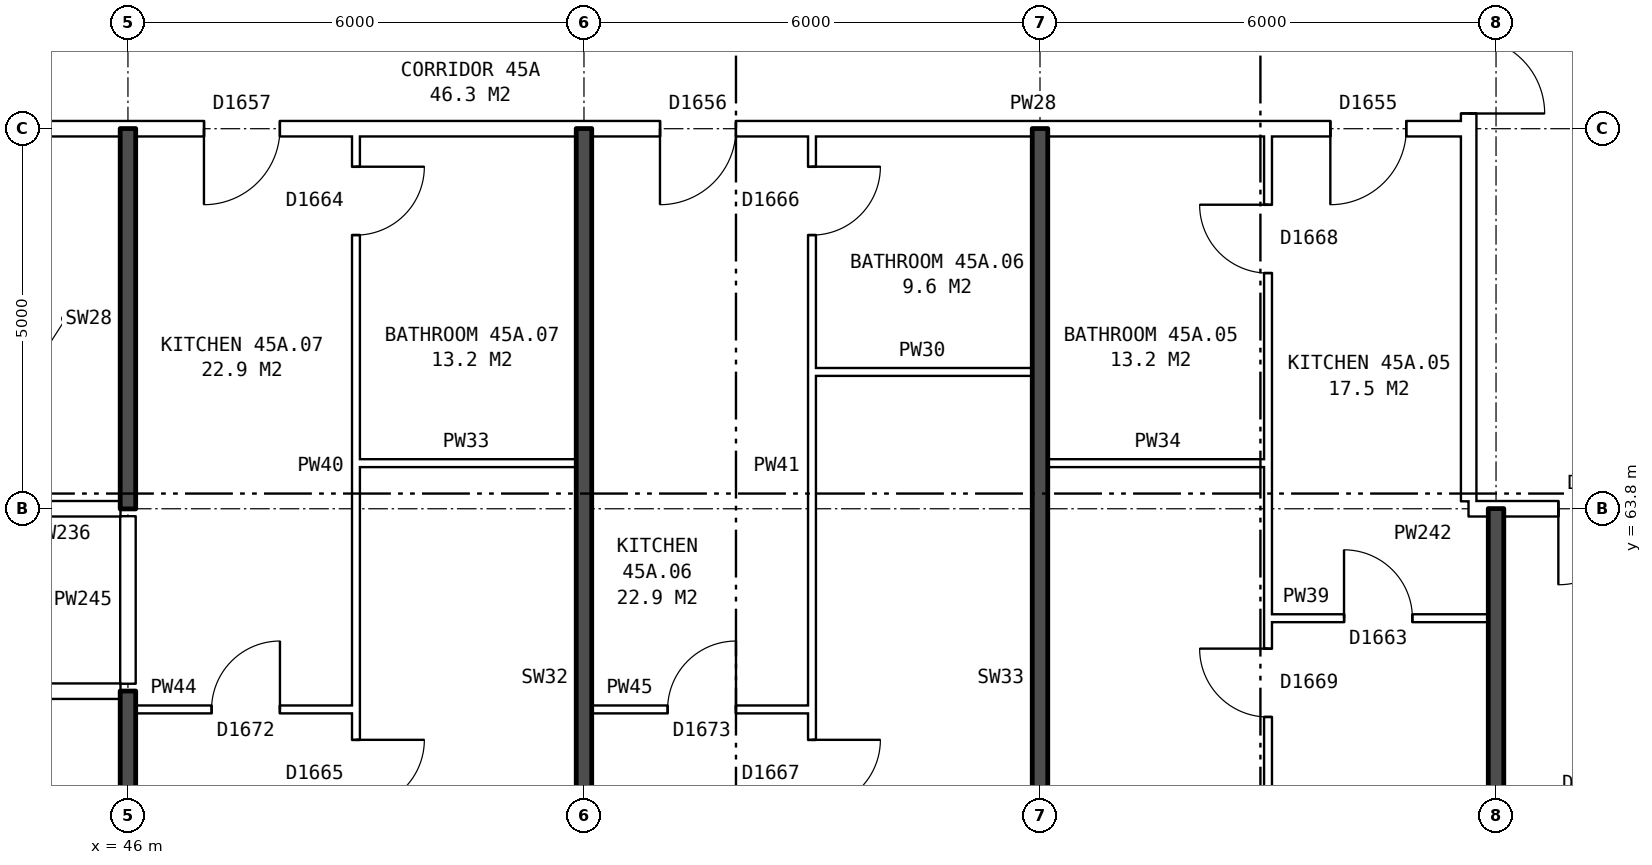
"""IFC4 building model, lengths in metres.
Left out: names, types, materials, properties, quantities, classifications, styles, units other than length and angle.
Written with IfcOpenShell. Run it as: python <this file> out.ifc"""

import sys

from ifc_helpers import new_model, si_unit, direction, frame, frame_2d, origin, place, context, subcontext, project, spatial, rectangle, extrude, element, fill, save


model = new_model("IFC4")
c1 = context("Model", 3, precision=1e-05, world=origin(), true_north=direction((0.0, 1.0)))
c2 = subcontext(c1, "Body", "Model", "MODEL_VIEW")
j1 = project(units=[si_unit("LENGTHUNIT", "METRE"), si_unit("PLANEANGLEUNIT", "RADIAN")], contexts=[c1])
p1 = place(None, origin())
s1 = spatial("IfcSite", under=j1, at=p1, CompositionType="ELEMENT")
p2 = place(p1, origin())
s2 = spatial("IfcBuilding", under=s1, at=p2, CompositionType="ELEMENT")
p3 = place(p2, frame((0.0, 0.0, 160.9)))
s3 = spatial("IfcBuildingStorey", under=s2, at=p3, CompositionType="ELEMENT", Elevation=160.9)
p4 = place(p3, frame((63.64, 63.9, 0.0), z_axis=(0.0, 0.0, 1.0), x_axis=(0.0, 1.0, 0.0)))
e1 = element("IfcWall", 1, at=p4, inside=s3, PredefinedType="PARTITIONING", context=c2, shape_type="SweptSolid", body=[
    extrude(rectangle(XDim=12.2, YDim=0.2, at=frame_2d((6.1, 0.0))), origin(), (0.0, 0.0, 1.0), 2.85),
])
p5 = place(p4, frame((5.1, 0.0, 0.0)))
e2 = element("IfcOpeningElement", 2, at=p5, cuts=e1, PredefinedType="OPENING", context=c2, shape_type="SweptSolid", body=[
    extrude(rectangle(XDim=2.0, YDim=2.1, at=frame_2d((1.0, 1.05))), frame((0.0, 0.11, 0.0), z_axis=(0.0, -1.0, 0.0), x_axis=(1.0, 0.0, 0.0)), (0.0, 0.0, 1.0), 0.22),
])
p6 = place(p3, frame((46.1, 61.16, 0.0), z_axis=(0.0, 0.0, 1.0), x_axis=(1.0, 0.0, 0.0)))
e3 = element("IfcWall", 3, at=p6, inside=s3, PredefinedType="PARTITIONING", context=c2, shape_type="SweptSolid", body=[
    extrude(rectangle(XDim=2.9, YDim=0.1, at=frame_2d((1.45, 0.0))), origin(), (0.0, 0.0, 1.0), 2.85),
])
p7 = place(p6, frame((1.0, 0.0, 0.0)))
e4 = element("IfcOpeningElement", 4, at=p7, cuts=e3, PredefinedType="OPENING", context=c2, shape_type="SweptSolid", body=[
    extrude(rectangle(XDim=0.9, YDim=2.1, at=frame_2d((0.45, 1.05))), frame((0.0, 0.06, 0.0), z_axis=(0.0, -1.0, 0.0), x_axis=(1.0, 0.0, 0.0)), (0.0, 0.0, 1.0), 0.12),
])
p8 = place(p3, frame((52.1, 61.16, 0.0), z_axis=(0.0, 0.0, 1.0), x_axis=(1.0, 0.0, 0.0)))
e5 = element("IfcWall", 5, at=p8, inside=s3, PredefinedType="PARTITIONING", context=c2, shape_type="SweptSolid", body=[
    extrude(rectangle(XDim=2.9, YDim=0.1, at=frame_2d((1.45, 0.0))), origin(), (0.0, 0.0, 1.0), 2.85),
])
p9 = place(p8, frame((1.0, 0.0, 0.0)))
e6 = element("IfcOpeningElement", 6, at=p9, cuts=e5, PredefinedType="OPENING", context=c2, shape_type="SweptSolid", body=[
    extrude(rectangle(XDim=0.9, YDim=2.1, at=frame_2d((0.45, 1.05))), frame((0.0, 0.06, 0.0), z_axis=(0.0, -1.0, 0.0), x_axis=(1.0, 0.0, 0.0)), (0.0, 0.0, 1.0), 0.12),
])
p10 = place(p3, frame((28.86, 61.4, 0.0), z_axis=(0.0, 0.0, 1.0), x_axis=(1.0, 0.0, 0.0)))
e7 = element("IfcWall", 7, at=p10, inside=s3, PredefinedType="PARTITIONING", context=c2, shape_type="SweptSolid", body=[
    extrude(rectangle(XDim=17.04, YDim=0.2, at=frame_2d((8.52, 0.0))), origin(), (0.0, 0.0, 1.0), 2.85),
])
p11 = place(p10, frame((14.59, 0.0, 0.0)))
e8 = element("IfcOpeningElement", 8, at=p11, cuts=e7, PredefinedType="OPENING", context=c2, shape_type="SweptSolid", body=[
    extrude(rectangle(XDim=1.0, YDim=2.1, at=frame_2d((0.5, 1.05))), frame((0.0, 0.11, 0.0), z_axis=(0.0, -1.0, 0.0), x_axis=(1.0, 0.0, 0.0)), (0.0, 0.0, 1.0), 0.22),
])
p12 = place(p10, frame((7.64, 0.0, 0.0)))
e9 = element("IfcOpeningElement", 9, at=p12, cuts=e7, PredefinedType="OPENING", context=c2, shape_type="SweptSolid", body=[
    extrude(rectangle(XDim=1.0, YDim=2.1, at=frame_2d((0.5, 1.05))), frame((0.0, 0.11, 0.0), z_axis=(0.0, -1.0, 0.0), x_axis=(1.0, 0.0, 0.0)), (0.0, 0.0, 1.0), 0.22),
])
p13 = place(p3, frame((61.0, 62.36, 0.0), z_axis=(0.0, 0.0, 1.0), x_axis=(1.0, 0.0, 0.0)))
e10 = element("IfcWall", 10, at=p13, inside=s3, PredefinedType="PARTITIONING", context=c2, shape_type="SweptSolid", body=[
    extrude(rectangle(XDim=2.9, YDim=0.1, at=frame_2d((1.45, 0.0))), origin(), (0.0, 0.0, 1.0), 2.85),
])
p14 = place(p13, frame((1.0, 0.0, 0.0)))
e11 = element("IfcOpeningElement", 11, at=p14, cuts=e10, PredefinedType="OPENING", context=c2, shape_type="SweptSolid", body=[
    extrude(rectangle(XDim=0.9, YDim=2.1, at=frame_2d((0.45, 1.05))), frame((0.0, 0.06, 0.0), z_axis=(0.0, -1.0, 0.0), x_axis=(1.0, 0.0, 0.0)), (0.0, 0.0, 1.0), 0.12),
])
p15 = place(p3, frame((44.36, 63.8, 0.0), z_axis=(0.0, 0.0, 1.0), x_axis=(1.0, 0.0, 0.0)))
e12 = element("IfcWall", 12, at=p15, inside=s3, PredefinedType="PARTITIONING", context=c2, shape_type="SweptSolid", body=[
    extrude(rectangle(XDim=1.54, YDim=0.2, at=frame_2d((0.77, 0.0))), origin(), (0.0, 0.0, 1.0), 2.85),
])
p16 = place(p3, frame((63.64, 63.8, 0.0), z_axis=(0.0, 0.0, 1.0), x_axis=(1.0, 0.0, 0.0)))
e13 = element("IfcWall", 13, at=p16, inside=s3, PredefinedType="PARTITIONING", context=c2, shape_type="SweptSolid", body=[
    extrude(rectangle(XDim=3.0, YDim=0.2, at=frame_2d((1.5, 0.0))), origin(), (0.0, 0.0, 1.0), 2.85),
])
p17 = place(p16, frame((1.18, 0.0, 0.0)))
e14 = element("IfcOpeningElement", 14, at=p17, cuts=e13, PredefinedType="OPENING", context=c2, shape_type="SweptSolid", body=[
    extrude(rectangle(XDim=1.0, YDim=2.1, at=frame_2d((0.5, 1.05))), frame((0.0, 0.11, 0.0), z_axis=(0.0, -1.0, 0.0), x_axis=(1.0, 0.0, 0.0)), (0.0, 0.0, 1.0), 0.22),
])
for number, where, z_axis, x_axis in (
    (15, (49.0, 64.4, 0.0), (0.0, 0.0, 1.0), (1.0, 0.0, 0.0)),
    (16, (58.1, 64.4, 0.0), (0.0, 0.0, 1.0), (1.0, 0.0, 0.0)),
    (17, (55.0, 65.6, 0.0), (0.0, 0.0, 1.0), (1.0, 0.0, 0.0)),
):
    element("IfcWall", number, at=place(p3, frame(where, z_axis=z_axis, x_axis=x_axis)), inside=s3, PredefinedType="PARTITIONING", context=c2, shape_type="SweptSolid", body=[
        extrude(rectangle(XDim=2.9, YDim=0.1, at=frame_2d((1.45, 0.0))), origin(), (0.0, 0.0, 1.0), 2.85),
    ])
p18 = place(p3, frame((44.36, 68.8, 0.0), z_axis=(0.0, 0.0, 1.0), x_axis=(1.0, 0.0, 0.0)))
e18 = element("IfcWall", 18, at=p18, inside=s3, PredefinedType="PARTITIONING", context=c2, shape_type="SweptSolid", body=[
    extrude(rectangle(XDim=19.28, YDim=0.2, at=frame_2d((9.64, 0.0))), origin(), (0.0, 0.0, 1.0), 2.85),
])
p19 = place(p18, frame((17.46, 0.0, 0.0)))
e19 = element("IfcOpeningElement", 19, at=p19, cuts=e18, PredefinedType="OPENING", context=c2, shape_type="SweptSolid", body=[
    extrude(rectangle(XDim=1.0, YDim=2.1, at=frame_2d((0.5, 1.05))), frame((0.0, 0.11, 0.0), z_axis=(0.0, -1.0, 0.0), x_axis=(1.0, 0.0, 0.0)), (0.0, 0.0, 1.0), 0.22),
])
p20 = place(p18, frame((8.64, 0.0, 0.0)))
e20 = element("IfcOpeningElement", 20, at=p20, cuts=e18, PredefinedType="OPENING", context=c2, shape_type="SweptSolid", body=[
    extrude(rectangle(XDim=1.0, YDim=2.1, at=frame_2d((0.5, 1.05))), frame((0.0, 0.11, 0.0), z_axis=(0.0, -1.0, 0.0), x_axis=(1.0, 0.0, 0.0)), (0.0, 0.0, 1.0), 0.22),
])
p21 = place(p18, frame((2.64, 0.0, 0.0)))
e21 = element("IfcOpeningElement", 21, at=p21, cuts=e18, PredefinedType="OPENING", context=c2, shape_type="SweptSolid", body=[
    extrude(rectangle(XDim=1.0, YDim=2.1, at=frame_2d((0.5, 1.05))), frame((0.0, 0.11, 0.0), z_axis=(0.0, -1.0, 0.0), x_axis=(1.0, 0.0, 0.0)), (0.0, 0.0, 1.0), 0.22),
])
p22 = place(p3, frame((46.0, 54.36, 0.0), z_axis=(0.0, 0.0, 1.0), x_axis=(0.0, 1.0, 0.0)))
e22 = element("IfcWall", 22, at=p22, inside=s3, PredefinedType="SOLIDWALL", context=c2, shape_type="SweptSolid", body=[
    extrude(rectangle(XDim=7.04, YDim=0.2, at=frame_2d((3.52, 0.0))), origin(), (0.0, 0.0, 1.0), 2.85),
])
p23 = place(p3, frame((46.0, 61.5, 0.0), z_axis=(0.0, 0.0, 1.0), x_axis=(0.0, 1.0, 0.0)))
e23 = element("IfcWall", 23, at=p23, inside=s3, PredefinedType="PARTITIONING", context=c2, shape_type="SweptSolid", body=[
    extrude(rectangle(XDim=2.2, YDim=0.2, at=frame_2d((1.1, 0.0))), origin(), (0.0, 0.0, 1.0), 2.85),
])
p24 = place(p3, frame((46.0, 63.8, 0.0), z_axis=(0.0, 0.0, 1.0), x_axis=(0.0, 1.0, 0.0)))
e24 = element("IfcWall", 24, at=p24, inside=s3, PredefinedType="SOLIDWALL", context=c2, shape_type="SweptSolid", body=[
    extrude(rectangle(XDim=5.0, YDim=0.2, at=frame_2d((2.5, 0.0))), origin(), (0.0, 0.0, 1.0), 2.85),
])
p25 = place(p3, frame((49.0, 54.36, 0.0), z_axis=(0.0, 0.0, 1.0), x_axis=(0.0, 1.0, 0.0)))
e25 = element("IfcWall", 25, at=p25, inside=s3, PredefinedType="PARTITIONING", context=c2, shape_type="SweptSolid", body=[
    extrude(rectangle(XDim=14.34, YDim=0.1, at=frame_2d((7.17, 0.0))), origin(), (0.0, 0.0, 1.0), 2.85),
])
p26 = place(p25, frame((5.5, 0.0, 0.0)))
e26 = element("IfcOpeningElement", 26, at=p26, cuts=e25, PredefinedType="OPENING", context=c2, shape_type="SweptSolid", body=[
    extrude(rectangle(XDim=0.9, YDim=2.1, at=frame_2d((0.45, 1.05))), frame((0.0, 0.06, 0.0), z_axis=(0.0, -1.0, 0.0), x_axis=(1.0, 0.0, 0.0)), (0.0, 0.0, 1.0), 0.12),
])
p27 = place(p25, frame((13.04, 0.0, 0.0)))
e27 = element("IfcOpeningElement", 27, at=p27, cuts=e25, PredefinedType="OPENING", context=c2, shape_type="SweptSolid", body=[
    extrude(rectangle(XDim=0.9, YDim=2.1, at=frame_2d((0.45, 1.05))), frame((0.0, 0.06, 0.0), z_axis=(0.0, -1.0, 0.0), x_axis=(1.0, 0.0, 0.0)), (0.0, 0.0, 1.0), 0.12),
])
p28 = place(p3, frame((52.0, 54.36, 0.0), z_axis=(0.0, 0.0, 1.0), x_axis=(0.0, 1.0, 0.0)))
e28 = element("IfcWall", 28, at=p28, inside=s3, PredefinedType="SOLIDWALL", context=c2, shape_type="SweptSolid", body=[
    extrude(rectangle(XDim=14.44, YDim=0.2, at=frame_2d((7.22, 0.0))), origin(), (0.0, 0.0, 1.0), 2.85),
])
p29 = place(p3, frame((55.0, 54.36, 0.0), z_axis=(0.0, 0.0, 1.0), x_axis=(0.0, 1.0, 0.0)))
e29 = element("IfcWall", 29, at=p29, inside=s3, PredefinedType="PARTITIONING", context=c2, shape_type="SweptSolid", body=[
    extrude(rectangle(XDim=14.34, YDim=0.1, at=frame_2d((7.17, 0.0))), origin(), (0.0, 0.0, 1.0), 2.85),
])
p30 = place(p29, frame((5.5, 0.0, 0.0)))
e30 = element("IfcOpeningElement", 30, at=p30, cuts=e29, PredefinedType="OPENING", context=c2, shape_type="SweptSolid", body=[
    extrude(rectangle(XDim=0.9, YDim=2.1, at=frame_2d((0.45, 1.05))), frame((0.0, 0.06, 0.0), z_axis=(0.0, -1.0, 0.0), x_axis=(1.0, 0.0, 0.0)), (0.0, 0.0, 1.0), 0.12),
])
p31 = place(p29, frame((13.04, 0.0, 0.0)))
e31 = element("IfcOpeningElement", 31, at=p31, cuts=e29, PredefinedType="OPENING", context=c2, shape_type="SweptSolid", body=[
    extrude(rectangle(XDim=0.9, YDim=2.1, at=frame_2d((0.45, 1.05))), frame((0.0, 0.06, 0.0), z_axis=(0.0, -1.0, 0.0), x_axis=(1.0, 0.0, 0.0)), (0.0, 0.0, 1.0), 0.12),
])
p32 = place(p3, frame((58.0, 54.36, 0.0), z_axis=(0.0, 0.0, 1.0), x_axis=(0.0, 1.0, 0.0)))
e32 = element("IfcWall", 32, at=p32, inside=s3, PredefinedType="SOLIDWALL", context=c2, shape_type="SweptSolid", body=[
    extrude(rectangle(XDim=14.44, YDim=0.2, at=frame_2d((7.22, 0.0))), origin(), (0.0, 0.0, 1.0), 2.85),
])
p33 = place(p3, frame((61.0, 54.36, 0.0), z_axis=(0.0, 0.0, 1.0), x_axis=(0.0, 1.0, 0.0)))
e33 = element("IfcWall", 33, at=p33, inside=s3, PredefinedType="PARTITIONING", context=c2, shape_type="SweptSolid", body=[
    extrude(rectangle(XDim=14.34, YDim=0.1, at=frame_2d((7.17, 0.0))), origin(), (0.0, 0.0, 1.0), 2.85),
])
p34 = place(p33, frame((6.7, 0.0, 0.0)))
e34 = element("IfcOpeningElement", 34, at=p34, cuts=e33, PredefinedType="OPENING", context=c2, shape_type="SweptSolid", body=[
    extrude(rectangle(XDim=0.9, YDim=2.1, at=frame_2d((0.45, 1.05))), frame((0.0, 0.06, 0.0), z_axis=(0.0, -1.0, 0.0), x_axis=(1.0, 0.0, 0.0)), (0.0, 0.0, 1.0), 0.12),
])
p35 = place(p33, frame((12.54, 0.0, 0.0)))
e35 = element("IfcOpeningElement", 35, at=p35, cuts=e33, PredefinedType="OPENING", context=c2, shape_type="SweptSolid", body=[
    extrude(rectangle(XDim=0.9, YDim=2.1, at=frame_2d((0.45, 1.05))), frame((0.0, 0.06, 0.0), z_axis=(0.0, -1.0, 0.0), x_axis=(1.0, 0.0, 0.0)), (0.0, 0.0, 1.0), 0.12),
])
p36 = place(p3, frame((64.0, 54.36, 0.0), z_axis=(0.0, 0.0, 1.0), x_axis=(0.0, 1.0, 0.0)))
e36 = element("IfcWall", 36, at=p36, inside=s3, PredefinedType="SOLIDWALL", context=c2, shape_type="SweptSolid", body=[
    extrude(rectangle(XDim=9.44, YDim=0.2, at=frame_2d((4.72, 0.0))), origin(), (0.0, 0.0, 1.0), 2.85),
])
p37 = place(p5, frame((2.0, 0.0, 0.0), z_axis=(0.0, 0.0, 1.0), x_axis=(-1.0, 0.0, 0.0)))
e37 = element("IfcDoor", 37, at=p37, inside=s3, OperationType="DOUBLE_DOOR_SINGLE_SWING", PredefinedType="DOOR", context=c2, shape_type="SweptSolid", body=[
    extrude(rectangle(XDim=2.0, YDim=2.1, at=frame_2d((1.0, 1.05))), frame((0.0, 0.025, 0.0), z_axis=(0.0, -1.0, 0.0), x_axis=(1.0, 0.0, 0.0)), (0.0, 0.0, 1.0), 0.05),
])
fill(e2, e37)
p38 = place(p17, frame((1.0, 0.0, 0.0), z_axis=(0.0, 0.0, 1.0), x_axis=(-1.0, 0.0, 0.0)))
e38 = element("IfcDoor", 38, at=p38, inside=s3, OperationType="SINGLE_SWING_RIGHT", PredefinedType="DOOR", context=c2, shape_type="SweptSolid", body=[
    extrude(rectangle(XDim=1.0, YDim=2.1, at=frame_2d((0.5, 1.05))), frame((0.0, 0.025, 0.0), z_axis=(0.0, -1.0, 0.0), x_axis=(1.0, 0.0, 0.0)), (0.0, 0.0, 1.0), 0.05),
])
fill(e14, e38)
p39 = place(p34, origin())
e39 = element("IfcDoor", 39, at=p39, inside=s3, OperationType="SINGLE_SWING_RIGHT", PredefinedType="DOOR", context=c2, shape_type="SweptSolid", body=[
    extrude(rectangle(XDim=0.9, YDim=2.1, at=frame_2d((0.45, 1.05))), frame((0.0, 0.025, 0.0), z_axis=(0.0, -1.0, 0.0), x_axis=(1.0, 0.0, 0.0)), (0.0, 0.0, 1.0), 0.05),
])
fill(e34, e39)
p40 = place(p19, frame((1.0, 0.0, 0.0), z_axis=(0.0, 0.0, 1.0), x_axis=(-1.0, 0.0, 0.0)))
e40 = element("IfcDoor", 40, at=p40, inside=s3, OperationType="SINGLE_SWING_RIGHT", PredefinedType="DOOR", context=c2, shape_type="SweptSolid", body=[
    extrude(rectangle(XDim=1.0, YDim=2.1, at=frame_2d((0.5, 1.05))), frame((0.0, 0.025, 0.0), z_axis=(0.0, -1.0, 0.0), x_axis=(1.0, 0.0, 0.0)), (0.0, 0.0, 1.0), 0.05),
])
fill(e19, e40)
p41 = place(p14, origin())
e41 = element("IfcDoor", 41, at=p41, inside=s3, OperationType="SINGLE_SWING_LEFT", PredefinedType="DOOR", context=c2, shape_type="SweptSolid", body=[
    extrude(rectangle(XDim=0.9, YDim=2.1, at=frame_2d((0.45, 1.05))), frame((0.0, 0.025, 0.0), z_axis=(0.0, -1.0, 0.0), x_axis=(1.0, 0.0, 0.0)), (0.0, 0.0, 1.0), 0.05),
])
fill(e11, e41)
p42 = place(p35, origin())
e42 = element("IfcDoor", 42, at=p42, inside=s3, OperationType="SINGLE_SWING_RIGHT", PredefinedType="DOOR", context=c2, shape_type="SweptSolid", body=[
    extrude(rectangle(XDim=0.9, YDim=2.1, at=frame_2d((0.45, 1.05))), frame((0.0, 0.025, 0.0), z_axis=(0.0, -1.0, 0.0), x_axis=(1.0, 0.0, 0.0)), (0.0, 0.0, 1.0), 0.05),
])
fill(e35, e42)
p43 = place(p30, frame((0.9, 0.0, 0.0), z_axis=(0.0, 0.0, 1.0), x_axis=(-1.0, 0.0, 0.0)))
e43 = element("IfcDoor", 43, at=p43, inside=s3, OperationType="SINGLE_SWING_LEFT", PredefinedType="DOOR", context=c2, shape_type="SweptSolid", body=[
    extrude(rectangle(XDim=0.9, YDim=2.1, at=frame_2d((0.45, 1.05))), frame((0.0, 0.025, 0.0), z_axis=(0.0, -1.0, 0.0), x_axis=(1.0, 0.0, 0.0)), (0.0, 0.0, 1.0), 0.05),
])
fill(e30, e43)
p44 = place(p20, frame((1.0, 0.0, 0.0), z_axis=(0.0, 0.0, 1.0), x_axis=(-1.0, 0.0, 0.0)))
e44 = element("IfcDoor", 44, at=p44, inside=s3, OperationType="SINGLE_SWING_RIGHT", PredefinedType="DOOR", context=c2, shape_type="SweptSolid", body=[
    extrude(rectangle(XDim=1.0, YDim=2.1, at=frame_2d((0.5, 1.05))), frame((0.0, 0.025, 0.0), z_axis=(0.0, -1.0, 0.0), x_axis=(1.0, 0.0, 0.0)), (0.0, 0.0, 1.0), 0.05),
])
fill(e20, e44)
p45 = place(p9, origin())
e45 = element("IfcDoor", 45, at=p45, inside=s3, OperationType="SINGLE_SWING_RIGHT", PredefinedType="DOOR", context=c2, shape_type="SweptSolid", body=[
    extrude(rectangle(XDim=0.9, YDim=2.1, at=frame_2d((0.45, 1.05))), frame((0.0, 0.025, 0.0), z_axis=(0.0, -1.0, 0.0), x_axis=(1.0, 0.0, 0.0)), (0.0, 0.0, 1.0), 0.05),
])
fill(e6, e45)
p46 = place(p31, frame((0.9, 0.0, 0.0), z_axis=(0.0, 0.0, 1.0), x_axis=(-1.0, 0.0, 0.0)))
e46 = element("IfcDoor", 46, at=p46, inside=s3, OperationType="SINGLE_SWING_LEFT", PredefinedType="DOOR", context=c2, shape_type="SweptSolid", body=[
    extrude(rectangle(XDim=0.9, YDim=2.1, at=frame_2d((0.45, 1.05))), frame((0.0, 0.025, 0.0), z_axis=(0.0, -1.0, 0.0), x_axis=(1.0, 0.0, 0.0)), (0.0, 0.0, 1.0), 0.05),
])
fill(e31, e46)
p47 = place(p26, frame((0.9, 0.0, 0.0), z_axis=(0.0, 0.0, 1.0), x_axis=(-1.0, 0.0, 0.0)))
e47 = element("IfcDoor", 47, at=p47, inside=s3, OperationType="SINGLE_SWING_LEFT", PredefinedType="DOOR", context=c2, shape_type="SweptSolid", body=[
    extrude(rectangle(XDim=0.9, YDim=2.1, at=frame_2d((0.45, 1.05))), frame((0.0, 0.025, 0.0), z_axis=(0.0, -1.0, 0.0), x_axis=(1.0, 0.0, 0.0)), (0.0, 0.0, 1.0), 0.05),
])
fill(e26, e47)
p48 = place(p21, frame((1.0, 0.0, 0.0), z_axis=(0.0, 0.0, 1.0), x_axis=(-1.0, 0.0, 0.0)))
e48 = element("IfcDoor", 48, at=p48, inside=s3, OperationType="SINGLE_SWING_RIGHT", PredefinedType="DOOR", context=c2, shape_type="SweptSolid", body=[
    extrude(rectangle(XDim=1.0, YDim=2.1, at=frame_2d((0.5, 1.05))), frame((0.0, 0.025, 0.0), z_axis=(0.0, -1.0, 0.0), x_axis=(1.0, 0.0, 0.0)), (0.0, 0.0, 1.0), 0.05),
])
fill(e21, e48)
p49 = place(p7, origin())
e49 = element("IfcDoor", 49, at=p49, inside=s3, OperationType="SINGLE_SWING_RIGHT", PredefinedType="DOOR", context=c2, shape_type="SweptSolid", body=[
    extrude(rectangle(XDim=0.9, YDim=2.1, at=frame_2d((0.45, 1.05))), frame((0.0, 0.025, 0.0), z_axis=(0.0, -1.0, 0.0), x_axis=(1.0, 0.0, 0.0)), (0.0, 0.0, 1.0), 0.05),
])
fill(e4, e49)
p50 = place(p27, frame((0.9, 0.0, 0.0), z_axis=(0.0, 0.0, 1.0), x_axis=(-1.0, 0.0, 0.0)))
e50 = element("IfcDoor", 50, at=p50, inside=s3, OperationType="SINGLE_SWING_LEFT", PredefinedType="DOOR", context=c2, shape_type="SweptSolid", body=[
    extrude(rectangle(XDim=0.9, YDim=2.1, at=frame_2d((0.45, 1.05))), frame((0.0, 0.025, 0.0), z_axis=(0.0, -1.0, 0.0), x_axis=(1.0, 0.0, 0.0)), (0.0, 0.0, 1.0), 0.05),
])
fill(e27, e50)
save(model, sys.argv[1])
